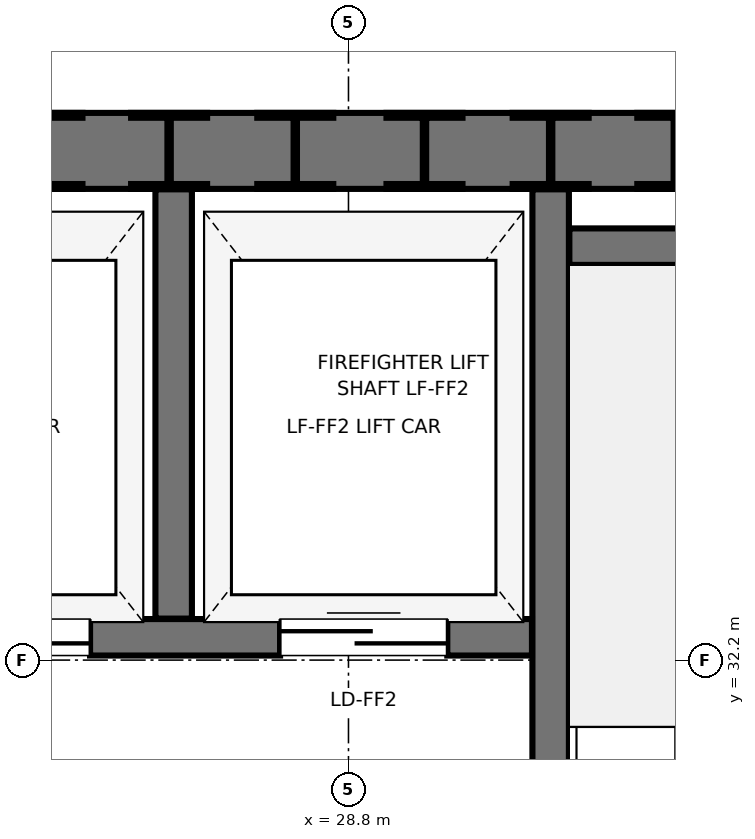
"""IFC4 building model, lengths in metres.
Left out: names, types, materials, properties, quantities, classifications, styles, units other than length and angle.
Written with IfcOpenShell. Run it as: python <this file> out.ifc"""

import sys

from ifc_helpers import new_model, si_unit, direction, frame, frame_2d, origin, origin_2d, place, context, subcontext, project, spatial, rectangle, i_section, extrude, element, fill, save


model = new_model("IFC4")
c1 = context("Model", 3, precision=1e-05, world=origin(), true_north=direction((0.0, 1.0)))
c2 = subcontext(c1, "Body", "Model", "MODEL_VIEW")
j1 = project(units=[si_unit("LENGTHUNIT", "METRE"), si_unit("PLANEANGLEUNIT", "RADIAN")], contexts=[c1])
p1 = place(None, origin())
s1 = spatial("IfcSite", under=j1, at=p1, CompositionType="ELEMENT")
p2 = place(p1, origin())
s2 = spatial("IfcBuilding", under=s1, at=p2, CompositionType="ELEMENT")
p3 = place(p2, frame((0.0, 0.0, 105.95)))
s3 = spatial("IfcBuildingStorey", under=s2, at=p3, CompositionType="ELEMENT", Elevation=105.95)
for number, where, z_axis, x_axis in (
    (1, (26.8, 35.55, 0.0), (0.0, 0.0, 1.0), (1.0, 0.0, 0.0)),
    (2, (28.45, 35.55, 0.0), (0.0, 0.0, 1.0), (1.0, 0.0, 0.0)),
    (3, (30.13, 35.55, 0.0), (0.0, 0.0, 1.0), (1.0, 0.0, 0.0)),
    (4, (27.62, 35.55, 0.0), (0.0, 0.0, 1.0), (1.0, 0.0, 0.0)),
    (5, (29.3, 35.55, 0.0), (0.0, 0.0, 1.0), (1.0, 0.0, 0.0)),
    (6, (30.95, 35.55, 0.0), (0.0, 0.0, 1.0), (1.0, 0.0, 0.0)),
):
    element("IfcColumn", number, at=place(p3, frame(where, z_axis=z_axis, x_axis=x_axis)), inside=s3, PredefinedType="COLUMN", context=c2, shape_type="SweptSolid", body=[
        extrude(i_section(OverallWidth=0.5, OverallDepth=0.5, WebThickness=0.022, FlangeThickness=0.032, at=origin_2d()), origin(), (0.0, 0.0, 1.0), 4.5),
    ])
p4 = place(p3, frame((50.35, 35.55, 0.0), z_axis=(0.0, 0.0, 1.0), x_axis=(-1.0, 0.0, 0.0)))
e7 = element("IfcWall", 7, at=p4, inside=s3, PredefinedType="SHEAR", context=c2, shape_type="SweptSolid", body=[
    extrude(rectangle(XDim=28.7, YDim=0.5, at=frame_2d((14.35, 0.0))), origin(), (0.0, 0.0, 1.0), 4.5),
])
p5 = place(p3, frame((30.13, 27.003, 0.0), z_axis=(0.0, 0.0, 1.0), x_axis=(0.0, 1.0, 0.0)))
e8 = element("IfcWall", 8, at=p5, inside=s3, PredefinedType="SHEAR", context=c2, shape_type="SweptSolid", body=[
    extrude(rectangle(XDim=8.294, YDim=0.24, at=frame_2d((4.147, 0.0))), origin(), (0.0, 0.0, 1.0), 4.5),
])
p6 = place(p3, frame((30.253, 34.92, 0.0), z_axis=(0.0, 0.0, 1.0), x_axis=(1.0, 0.0, 0.0)))
e9 = element("IfcWall", 9, at=p6, inside=s3, PredefinedType="SHEAR", context=c2, shape_type="SweptSolid", body=[
    extrude(rectangle(XDim=2.994, YDim=0.24, at=frame_2d((1.497, 0.0))), origin(), (0.0, 0.0, 1.0), 4.5),
])
p7 = place(p3, frame((25.293, 32.35, 0.0), z_axis=(0.0, 0.0, 1.0), x_axis=(1.0, 0.0, 0.0)))
e10 = element("IfcWall", 10, at=p7, inside=s3, PredefinedType="SHEAR", context=c2, shape_type="SweptSolid", body=[
    extrude(rectangle(XDim=4.714, YDim=0.24, at=frame_2d((2.357, 0.0))), origin(), (0.0, 0.0, 1.0), 4.5),
])
p8 = place(p7, frame((0.707, 0.0, 0.0)))
e11 = element("IfcOpeningElement", 11, at=p8, cuts=e10, PredefinedType="OPENING", context=c2, shape_type="SweptSolid", body=[
    extrude(rectangle(XDim=1.1, YDim=2.0, at=frame_2d((0.55, 1.0))), frame((0.0, 0.13, 0.0), z_axis=(0.0, -1.0, 0.0), x_axis=(1.0, 0.0, 0.0)), (0.0, 0.0, 1.0), 0.26),
])
p9 = place(p7, frame((3.057, 0.0, 0.0)))
e12 = element("IfcOpeningElement", 12, at=p9, cuts=e10, PredefinedType="OPENING", context=c2, shape_type="SweptSolid", body=[
    extrude(rectangle(XDim=1.1, YDim=2.0, at=frame_2d((0.55, 1.0))), frame((0.0, 0.13, 0.0), z_axis=(0.0, -1.0, 0.0), x_axis=(1.0, 0.0, 0.0)), (0.0, 0.0, 1.0), 0.26),
])
p10 = place(p3, frame((27.65, 32.473, 0.0), z_axis=(0.0, 0.0, 1.0), x_axis=(0.0, 1.0, 0.0)))
e13 = element("IfcWall", 13, at=p10, inside=s3, PredefinedType="SHEAR", context=c2, shape_type="SweptSolid", body=[
    extrude(rectangle(XDim=2.824, YDim=0.24, at=frame_2d((1.412, 0.0))), origin(), (0.0, 0.0, 1.0), 4.5),
])
p11 = place(p8, origin())
e14 = element("IfcDoor", 14, at=p11, inside=s3, OperationType="DOUBLE_DOOR_SLIDING", PredefinedType="USERDEFINED", context=c2, shape_type="SweptSolid", body=[
    extrude(rectangle(XDim=1.1, YDim=2.0, at=frame_2d((0.55, 1.0))), frame((0.0, 0.025, 0.0), z_axis=(0.0, -1.0, 0.0), x_axis=(1.0, 0.0, 0.0)), (0.0, 0.0, 1.0), 0.05),
])
fill(e11, e14)
p12 = place(p9, origin())
e15 = element("IfcDoor", 15, at=p12, inside=s3, OperationType="DOUBLE_DOOR_SLIDING", PredefinedType="USERDEFINED", context=c2, shape_type="SweptSolid", body=[
    extrude(rectangle(XDim=1.1, YDim=2.0, at=frame_2d((0.55, 1.0))), frame((0.0, 0.025, 0.0), z_axis=(0.0, -1.0, 0.0), x_axis=(1.0, 0.0, 0.0)), (0.0, 0.0, 1.0), 0.05),
])
fill(e12, e15)
save(model, sys.argv[1])
